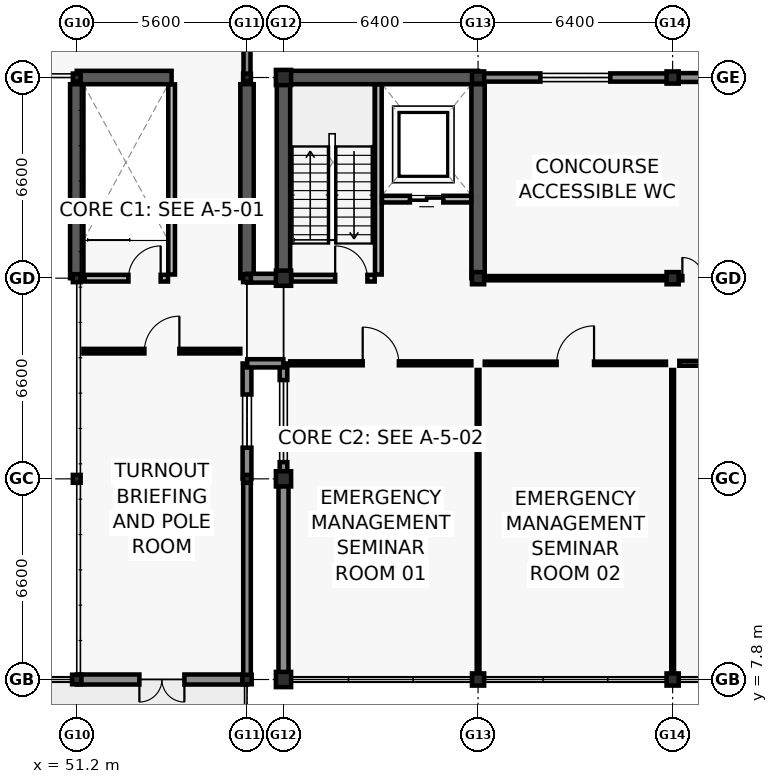
"""IFC4 building model, lengths in metres.
Left out: names, types, materials, properties, quantities, classifications, styles, units other than length and angle.
Written with IfcOpenShell. Run it as: python <this file> out.ifc"""

import sys

from ifc_helpers import new_model, si_unit, direction, frame, frame_2d, origin, origin_2d, place, context, subcontext, project, spatial, rectangle, i_section, extrude, element, fill, save


model = new_model("IFC4")
c1 = context("Model", 3, precision=1e-05, world=origin(), true_north=direction((0.0, 1.0)))
c2 = subcontext(c1, "Body", "Model", "MODEL_VIEW")
j1 = project(units=[si_unit("LENGTHUNIT", "METRE"), si_unit("PLANEANGLEUNIT", "RADIAN")], contexts=[c1])
p1 = place(None, origin())
s1 = spatial("IfcSite", under=j1, at=p1, CompositionType="ELEMENT")
p2 = place(p1, origin())
s2 = spatial("IfcBuilding", under=s1, at=p2, CompositionType="ELEMENT")
p3 = place(p2, frame((0.0, 0.0, 5.4)))
s3 = spatial("IfcBuildingStorey", under=s2, at=p3, CompositionType="ELEMENT", Elevation=5.4)
p4 = place(p3, frame((51.2, 7.8, 0.0), z_axis=(0.0, 0.0, 1.0), x_axis=(1.0, 0.0, 0.0)))
e1 = element("IfcColumn", 1, at=p4, inside=s3, PredefinedType="COLUMN", context=c2, shape_type="SweptSolid", body=[
    extrude(i_section(OverallWidth=0.307, OverallDepth=0.315, WebThickness=0.012, FlangeThickness=0.019, FilletRadius=0.017, at=origin_2d()), origin(), (0.0, 0.0, 1.0), 4.2),
])
for number, where, z_axis, x_axis in (
    (2, (51.2, 14.4, 0.0), (0.0, 0.0, 1.0), (1.0, 0.0, 0.0)),
    (3, (51.2, 21.0, 0.0), (0.0, 0.0, 1.0), (1.0, 0.0, 0.0)),
    (4, (51.2, 27.6, 0.0), (0.0, 0.0, 1.0), (1.0, 0.0, 0.0)),
):
    element("IfcColumn", number, at=place(p3, frame(where, z_axis=z_axis, x_axis=x_axis)), inside=s3, PredefinedType="COLUMN", context=c2, shape_type="SweptSolid", body=[
        extrude(i_section(OverallWidth=0.256, OverallDepth=0.26, WebThickness=0.01, FlangeThickness=0.017, FilletRadius=0.013, at=origin_2d()), origin(), (0.0, 0.0, 1.0), 4.2),
    ])
p5 = place(p3, frame((56.8, 7.8, 0.0), z_axis=(0.0, 0.0, 1.0), x_axis=(1.0, 0.0, 0.0)))
e5 = element("IfcColumn", 5, at=p5, inside=s3, PredefinedType="COLUMN", context=c2, shape_type="SweptSolid", body=[
    extrude(i_section(OverallWidth=0.307, OverallDepth=0.315, WebThickness=0.012, FlangeThickness=0.019, FilletRadius=0.017, at=origin_2d()), origin(), (0.0, 0.0, 1.0), 4.2),
])
for number, where, z_axis, x_axis in (
    (6, (56.8, 14.4, 0.0), (0.0, 0.0, 1.0), (1.0, 0.0, 0.0)),
    (7, (56.8, 21.0, 0.0), (0.0, 0.0, 1.0), (1.0, 0.0, 0.0)),
    (8, (56.8, 27.6, 0.0), (0.0, 0.0, 1.0), (1.0, 0.0, 0.0)),
):
    element("IfcColumn", number, at=place(p3, frame(where, z_axis=z_axis, x_axis=x_axis)), inside=s3, PredefinedType="COLUMN", context=c2, shape_type="SweptSolid", body=[
        extrude(i_section(OverallWidth=0.256, OverallDepth=0.26, WebThickness=0.01, FlangeThickness=0.017, FilletRadius=0.013, at=origin_2d()), origin(), (0.0, 0.0, 1.0), 4.2),
    ])
for number, where, z_axis, x_axis in (
    (9, (58.0, 7.8, 0.0), (0.0, 0.0, 1.0), (1.0, 0.0, 0.0)),
    (10, (58.0, 14.4, 0.0), (0.0, 0.0, 1.0), (1.0, 0.0, 0.0)),
    (11, (58.0, 21.0, 0.0), (0.0, 0.0, 1.0), (1.0, 0.0, 0.0)),
    (12, (58.0, 27.6, 0.0), (0.0, 0.0, 1.0), (1.0, 0.0, 0.0)),
):
    element("IfcColumn", number, at=place(p3, frame(where, z_axis=z_axis, x_axis=x_axis)), inside=s3, PredefinedType="COLUMN", context=c2, shape_type="SweptSolid", body=[
        extrude(i_section(OverallWidth=0.5, OverallDepth=0.5, WebThickness=0.02, FlangeThickness=0.036, at=origin_2d()), origin(), (0.0, 0.0, 1.0), 4.2),
    ])
for number, where, z_axis, x_axis in (
    (13, (64.4, 7.8, 0.0), (0.0, 0.0, 1.0), (1.0, 0.0, 0.0)),
    (14, (64.4, 21.0, 0.0), (0.0, 0.0, 1.0), (1.0, 0.0, 0.0)),
    (15, (64.4, 27.6, 0.0), (0.0, 0.0, 1.0), (1.0, 0.0, 0.0)),
    (16, (70.8, 7.8, 0.0), (0.0, 0.0, 1.0), (1.0, 0.0, 0.0)),
    (17, (70.8, 21.0, 0.0), (0.0, 0.0, 1.0), (1.0, 0.0, 0.0)),
    (18, (70.8, 27.6, 0.0), (0.0, 0.0, 1.0), (1.0, 0.0, 0.0)),
):
    element("IfcColumn", number, at=place(p3, frame(where, z_axis=z_axis, x_axis=x_axis)), inside=s3, PredefinedType="COLUMN", context=c2, shape_type="SweptSolid", body=[
        extrude(i_section(OverallWidth=0.4, OverallDepth=0.4, WebThickness=0.02, FlangeThickness=0.032, at=origin_2d()), origin(), (0.0, 0.0, 1.0), 4.2),
    ])
p6 = place(p3, frame((51.2, 27.6, 0.0), z_axis=(0.0, 0.0, 1.0), x_axis=(1.0, 0.0, 0.0)))
e19 = element("IfcWall", 19, at=p6, inside=s3, PredefinedType="SHEAR", context=c2, shape_type="SweptSolid", body=[
    extrude(rectangle(XDim=3.12, YDim=0.44, at=frame_2d((1.56, 0.0))), origin(), (0.0, 0.0, 1.0), 3.96),
])
for number, where, z_axis, x_axis in (
    (20, (51.2, 21.0, 0.0), (0.0, 0.0, 1.0), (0.0, 1.0, 0.0)),
    (21, (56.8, 21.0, 0.0), (0.0, 0.0, 1.0), (0.0, 1.0, 0.0)),
):
    element("IfcWall", number, at=place(p3, frame(where, z_axis=z_axis, x_axis=x_axis)), inside=s3, PredefinedType="SHEAR", context=c2, shape_type="SweptSolid", body=[
        extrude(rectangle(XDim=6.38, YDim=0.44, at=frame_2d((3.19, 0.0))), origin(), (0.0, 0.0, 1.0), 3.96),
    ])
p7 = place(p3, frame((58.0, 27.6, 0.0), z_axis=(0.0, 0.0, 1.0), x_axis=(1.0, 0.0, 0.0)))
e22 = element("IfcWall", 22, at=p7, inside=s3, PredefinedType="SHEAR", context=c2, shape_type="SweptSolid", body=[
    extrude(rectangle(XDim=6.4, YDim=0.44, at=frame_2d((3.2, 0.0))), origin(), (0.0, 0.0, 1.0), 3.96),
])
for number, where, z_axis, x_axis in (
    (23, (58.0, 21.0, 0.0), (0.0, 0.0, 1.0), (0.0, 1.0, 0.0)),
    (24, (64.4, 21.0, 0.0), (0.0, 0.0, 1.0), (0.0, 1.0, 0.0)),
):
    element("IfcWall", number, at=place(p3, frame(where, z_axis=z_axis, x_axis=x_axis)), inside=s3, PredefinedType="SHEAR", context=c2, shape_type="SweptSolid", body=[
        extrude(rectangle(XDim=6.38, YDim=0.44, at=frame_2d((3.19, 0.0))), origin(), (0.0, 0.0, 1.0), 3.96),
    ])
p8 = place(p3, frame((56.795, 7.8, 0.0), z_axis=(0.0, 0.0, 1.0), x_axis=(-1.0, 0.0, 0.0)))
e25 = element("IfcWall", 25, at=p8, inside=s3, PredefinedType="SOLIDWALL", context=c2, shape_type="SweptSolid", body=[
    extrude(rectangle(XDim=5.59, YDim=0.33, at=frame_2d((2.795, 0.0))), origin(), (0.0, 0.0, 1.0), 3.32),
])
p9 = place(p8, frame((2.055, 0.0, 0.0)))
e26 = element("IfcOpeningElement", 26, at=p9, cuts=e25, PredefinedType="OPENING", context=c2, shape_type="SweptSolid", body=[
    extrude(rectangle(XDim=1.48, YDim=2.16, at=frame_2d((0.74, 1.08))), frame((0.0, 0.175, 0.0), z_axis=(0.0, -1.0, 0.0), x_axis=(1.0, 0.0, 0.0)), (0.0, 0.0, 1.0), 0.35),
])
p10 = place(p3, frame((56.8, 14.395, 0.0), z_axis=(0.0, 0.0, 1.0), x_axis=(0.0, -1.0, 0.0)))
e27 = element("IfcWall", 27, at=p10, inside=s3, PredefinedType="SOLIDWALL", context=c2, shape_type="SweptSolid", body=[
    extrude(rectangle(XDim=6.59, YDim=0.25, at=frame_2d((3.295, 0.0))), origin(), (0.0, 0.0, 1.0), 3.32),
])
p11 = place(p3, frame((56.8, 18.195, 0.0), z_axis=(0.0, 0.0, 1.0), x_axis=(0.0, -1.0, 0.0)))
e28 = element("IfcWall", 28, at=p11, inside=s3, PredefinedType="SOLIDWALL", context=c2, shape_type="SweptSolid", body=[
    extrude(rectangle(XDim=3.79, YDim=0.29, at=frame_2d((1.895, 0.0))), origin(), (0.0, 0.0, 1.0), 3.32),
])
p12 = place(p11, frame((1.02, 0.0, 0.8)))
e29 = element("IfcOpeningElement", 29, at=p12, cuts=e28, PredefinedType="OPENING", context=c2, shape_type="SweptSolid", body=[
    extrude(rectangle(XDim=1.75, YDim=1.8, at=frame_2d((0.875, 0.9))), frame((0.0, 0.155, 0.0), z_axis=(0.0, -1.0, 0.0), x_axis=(1.0, 0.0, 0.0)), (0.0, 0.0, 1.0), 0.31),
])
p13 = place(p3, frame((56.8, 34.195, 0.0), z_axis=(0.0, 0.0, 1.0), x_axis=(0.0, -1.0, 0.0)))
e30 = element("IfcWall", 30, at=p13, inside=s3, PredefinedType="SOLIDWALL", context=c2, shape_type="SweptSolid", body=[
    extrude(rectangle(XDim=6.59, YDim=0.23, at=frame_2d((3.295, 0.0))), origin(), (0.0, 0.0, 1.0), 3.32),
])
p14 = place(p13, frame((0.913, 0.0, 0.8)))
e31 = element("IfcOpeningElement", 31, at=p14, cuts=e30, PredefinedType="OPENING", context=c2, shape_type="SweptSolid", body=[
    extrude(rectangle(XDim=2.2, YDim=1.8, at=frame_2d((1.1, 0.9))), frame((0.0, 0.125, 0.0), z_axis=(0.0, -1.0, 0.0), x_axis=(1.0, 0.0, 0.0)), (0.0, 0.0, 1.0), 0.25),
])
p15 = place(p3, frame((64.405, 27.6, 0.0), z_axis=(0.0, 0.0, 1.0), x_axis=(1.0, 0.0, 0.0)))
e32 = element("IfcWall", 32, at=p15, inside=s3, PredefinedType="SOLIDWALL", context=c2, shape_type="SweptSolid", body=[
    extrude(rectangle(XDim=6.39, YDim=0.27, at=frame_2d((3.195, 0.0))), origin(), (0.0, 0.0, 1.0), 3.32),
])
p16 = place(p15, frame((2.045, 0.0, 0.72)))
e33 = element("IfcOpeningElement", 33, at=p16, cuts=e32, PredefinedType="OPENING", context=c2, shape_type="SweptSolid", body=[
    extrude(rectangle(XDim=2.3, YDim=1.15, at=frame_2d((1.15, 0.575))), frame((0.0, 0.145, 0.0), z_axis=(0.0, -1.0, 0.0), x_axis=(1.0, 0.0, 0.0)), (0.0, 0.0, 1.0), 0.29),
])
p17 = place(p3, frame((70.805, 27.6, 0.0), z_axis=(0.0, 0.0, 1.0), x_axis=(1.0, 0.0, 0.0)))
e34 = element("IfcWall", 34, at=p17, inside=s3, PredefinedType="SOLIDWALL", context=c2, shape_type="SweptSolid", body=[
    extrude(rectangle(XDim=6.39, YDim=0.29, at=frame_2d((3.195, 0.0))), origin(), (0.0, 0.0, 1.0), 3.32),
])
p18 = place(p17, frame((1.945, 0.0, 0.72)))
e35 = element("IfcOpeningElement", 35, at=p18, cuts=e34, PredefinedType="OPENING", context=c2, shape_type="SweptSolid", body=[
    extrude(rectangle(XDim=2.5, YDim=1.15, at=frame_2d((1.25, 0.575))), frame((0.0, 0.155, 0.0), z_axis=(0.0, -1.0, 0.0), x_axis=(1.0, 0.0, 0.0)), (0.0, 0.0, 1.0), 0.31),
])
p19 = place(p3, frame((58.0, 7.805, 0.0), z_axis=(0.0, 0.0, 1.0), x_axis=(0.0, 1.0, 0.0)))
e36 = element("IfcWall", 36, at=p19, inside=s3, PredefinedType="SOLIDWALL", context=c2, shape_type="SweptSolid", body=[
    extrude(rectangle(XDim=6.59, YDim=0.33, at=frame_2d((3.295, 0.0))), origin(), (0.0, 0.0, 1.0), 3.32),
])
p20 = place(p3, frame((58.0, 14.405, 0.0), z_axis=(0.0, 0.0, 1.0), x_axis=(0.0, 1.0, 0.0)))
e37 = element("IfcWall", 37, at=p20, inside=s3, PredefinedType="SOLIDWALL", context=c2, shape_type="SweptSolid", body=[
    extrude(rectangle(XDim=3.79, YDim=0.25, at=frame_2d((1.895, 0.0))), origin(), (0.0, 0.0, 1.0), 3.32),
])
p21 = place(p20, frame((0.545, 0.0, 0.72)))
e38 = element("IfcOpeningElement", 38, at=p21, cuts=e37, PredefinedType="OPENING", context=c2, shape_type="SweptSolid", body=[
    extrude(rectangle(XDim=2.7, YDim=1.15, at=frame_2d((1.35, 0.575))), frame((0.0, 0.135, 0.0), z_axis=(0.0, -1.0, 0.0), x_axis=(1.0, 0.0, 0.0)), (0.0, 0.0, 1.0), 0.27),
])
p22 = place(p3, frame((57.995, 18.2, 0.0), z_axis=(0.0, 0.0, 1.0), x_axis=(-1.0, 0.0, 0.0)))
e39 = element("IfcWall", 39, at=p22, inside=s3, PredefinedType="SOLIDWALL", context=c2, shape_type="SweptSolid", body=[
    extrude(rectangle(XDim=1.19, YDim=0.27, at=frame_2d((0.595, 0.0))), origin(), (0.0, 0.0, 1.0), 3.32),
])
p23 = place(p3, frame((56.805, 21.0, 0.0), z_axis=(0.0, 0.0, 1.0), x_axis=(1.0, 0.0, 0.0)))
e40 = element("IfcWall", 40, at=p23, inside=s3, PredefinedType="SOLIDWALL", context=c2, shape_type="SweptSolid", body=[
    extrude(rectangle(XDim=1.19, YDim=0.29, at=frame_2d((0.595, 0.0))), origin(), (0.0, 0.0, 1.0), 3.32),
])
p24 = place(p3, frame((54.32, 21.12, 0.0), z_axis=(0.0, 0.0, 1.0), x_axis=(0.0, 1.0, 0.0)))
e41 = element("IfcWall", 41, at=p24, inside=s3, PredefinedType="SOLIDWALL", context=c2, shape_type="SweptSolid", body=[
    extrude(rectangle(XDim=6.255, YDim=0.22, at=frame_2d((3.127, 0.0))), origin(), (0.0, 0.0, 1.0), 3.96),
])
p25 = place(p3, frame((51.46, 21.0, 0.0), z_axis=(0.0, 0.0, 1.0), x_axis=(1.0, 0.0, 0.0)))
e42 = element("IfcWall", 42, at=p25, inside=s3, PredefinedType="SOLIDWALL", context=c2, shape_type="SweptSolid", body=[
    extrude(rectangle(XDim=2.74, YDim=0.22, at=frame_2d((1.37, 0.0))), origin(), (0.0, 0.0, 1.0), 3.32),
])
p26 = place(p25, frame((1.44, 0.0, 0.0)))
e43 = element("IfcOpeningElement", 43, at=p26, cuts=e42, PredefinedType="OPENING", context=c2, shape_type="SweptSolid", body=[
    extrude(rectangle(XDim=1.06, YDim=2.1, at=frame_2d((0.53, 1.05))), frame((0.0, 0.12, 0.0), z_axis=(0.0, -1.0, 0.0), x_axis=(1.0, 0.0, 0.0)), (0.0, 0.0, 1.0), 0.24),
])
p27 = place(p3, frame((61.12, 21.12, 0.0), z_axis=(0.0, 0.0, 1.0), x_axis=(0.0, 1.0, 0.0)))
e44 = element("IfcWall", 44, at=p27, inside=s3, PredefinedType="SOLIDWALL", context=c2, shape_type="SweptSolid", body=[
    extrude(rectangle(XDim=6.255, YDim=0.22, at=frame_2d((3.127, 0.0))), origin(), (0.0, 0.0, 1.0), 3.96),
])
p28 = place(p3, frame((58.26, 21.0, 0.0), z_axis=(0.0, 0.0, 1.0), x_axis=(1.0, 0.0, 0.0)))
e45 = element("IfcWall", 45, at=p28, inside=s3, PredefinedType="SOLIDWALL", context=c2, shape_type="SweptSolid", body=[
    extrude(rectangle(XDim=2.74, YDim=0.22, at=frame_2d((1.37, 0.0))), origin(), (0.0, 0.0, 1.0), 3.32),
])
p29 = place(p28, frame((1.44, 0.0, 0.0)))
e46 = element("IfcOpeningElement", 46, at=p29, cuts=e45, PredefinedType="OPENING", context=c2, shape_type="SweptSolid", body=[
    extrude(rectangle(XDim=1.06, YDim=2.1, at=frame_2d((0.53, 1.05))), frame((0.0, 0.12, 0.0), z_axis=(0.0, -1.0, 0.0), x_axis=(1.0, 0.0, 0.0)), (0.0, 0.0, 1.0), 0.24),
])
p30 = place(p3, frame((61.24, 23.6, 0.0), z_axis=(0.0, 0.0, 1.0), x_axis=(1.0, 0.0, 0.0)))
e47 = element("IfcWall", 47, at=p30, inside=s3, PredefinedType="SOLIDWALL", context=c2, shape_type="SweptSolid", body=[
    extrude(rectangle(XDim=2.935, YDim=0.22, at=frame_2d((1.468, 0.0))), origin(), (0.0, 0.0, 1.0), 3.96),
])
p31 = place(p30, frame((0.917, 0.0, 0.0)))
e48 = element("IfcOpeningElement", 48, at=p31, cuts=e47, PredefinedType="OPENING", context=c2, shape_type="SweptSolid", body=[
    extrude(rectangle(XDim=1.1, YDim=2.1, at=frame_2d((0.55, 1.05))), frame((0.0, 0.12, 0.0), z_axis=(0.0, -1.0, 0.0), x_axis=(1.0, 0.0, 0.0)), (0.0, 0.0, 1.0), 0.24),
])
p32 = place(p3, frame((51.42, 18.6, 0.0), z_axis=(0.0, 0.0, 1.0), x_axis=(1.0, 0.0, 0.0)))
e49 = element("IfcWall", 49, at=p32, inside=s3, PredefinedType="PARTITIONING", context=c2, shape_type="SweptSolid", body=[
    extrude(rectangle(XDim=5.16, YDim=0.15, at=frame_2d((2.58, 0.0))), origin(), (0.0, 0.0, 1.0), 3.3),
])
p33 = place(p32, frame((2.005, 0.0, 0.0)))
e50 = element("IfcOpeningElement", 50, at=p33, cuts=e49, PredefinedType="OPENING", context=c2, shape_type="SweptSolid", body=[
    extrude(rectangle(XDim=1.15, YDim=2.12, at=frame_2d((0.575, 1.06))), frame((0.0, 0.085, 0.0), z_axis=(0.0, -1.0, 0.0), x_axis=(1.0, 0.0, 0.0)), (0.0, 0.0, 1.0), 0.17),
])
p34 = place(p3, frame((64.4, 8.02, 0.0), z_axis=(0.0, 0.0, 1.0), x_axis=(0.0, 1.0, 0.0)))
e51 = element("IfcWall", 51, at=p34, inside=s3, PredefinedType="MOVABLE", context=c2, shape_type="SweptSolid", body=[
    extrude(rectangle(XDim=9.96, YDim=0.09, at=frame_2d((4.98, 0.0))), origin(), (0.0, 0.0, 1.0), 3.3),
])
p35 = place(p3, frame((58.22, 18.2, 0.0), z_axis=(0.0, 0.0, 1.0), x_axis=(1.0, 0.0, 0.0)))
e52 = element("IfcWall", 52, at=p35, inside=s3, PredefinedType="PARTITIONING", context=c2, shape_type="SweptSolid", body=[
    extrude(rectangle(XDim=5.96, YDim=0.13, at=frame_2d((2.98, 0.0))), origin(), (0.0, 0.0, 1.0), 3.3),
])
p36 = place(p35, frame((2.385, 0.0, 0.0)))
e53 = element("IfcOpeningElement", 53, at=p36, cuts=e52, PredefinedType="OPENING", context=c2, shape_type="SweptSolid", body=[
    extrude(rectangle(XDim=1.19, YDim=2.14, at=frame_2d((0.595, 1.07))), frame((0.0, 0.075, 0.0), z_axis=(0.0, -1.0, 0.0), x_axis=(1.0, 0.0, 0.0)), (0.0, 0.0, 1.0), 0.15),
])
p37 = place(p3, frame((70.8, 8.02, 0.0), z_axis=(0.0, 0.0, 1.0), x_axis=(0.0, 1.0, 0.0)))
e54 = element("IfcWall", 54, at=p37, inside=s3, PredefinedType="MOVABLE", context=c2, shape_type="SweptSolid", body=[
    extrude(rectangle(XDim=9.96, YDim=0.09, at=frame_2d((4.98, 0.0))), origin(), (0.0, 0.0, 1.0), 3.3),
])
p38 = place(p3, frame((64.62, 18.2, 0.0), z_axis=(0.0, 0.0, 1.0), x_axis=(1.0, 0.0, 0.0)))
e55 = element("IfcWall", 55, at=p38, inside=s3, PredefinedType="PARTITIONING", context=c2, shape_type="SweptSolid", body=[
    extrude(rectangle(XDim=5.96, YDim=0.11, at=frame_2d((2.98, 0.0))), origin(), (0.0, 0.0, 1.0), 3.3),
])
p39 = place(p38, frame((2.365, 0.0, 0.0)))
e56 = element("IfcOpeningElement", 56, at=p39, cuts=e55, PredefinedType="OPENING", context=c2, shape_type="SweptSolid", body=[
    extrude(rectangle(XDim=1.23, YDim=2.08, at=frame_2d((0.615, 1.04))), frame((0.0, 0.065, 0.0), z_axis=(0.0, -1.0, 0.0), x_axis=(1.0, 0.0, 0.0)), (0.0, 0.0, 1.0), 0.13),
])
p40 = place(p3, frame((71.02, 18.2, 0.0), z_axis=(0.0, 0.0, 1.0), x_axis=(1.0, 0.0, 0.0)))
e57 = element("IfcWall", 57, at=p40, inside=s3, PredefinedType="PARTITIONING", context=c2, shape_type="SweptSolid", body=[
    extrude(rectangle(XDim=5.96, YDim=0.16, at=frame_2d((2.98, 0.0))), origin(), (0.0, 0.0, 1.0), 3.3),
])
p41 = place(p40, frame((2.345, 0.0, 0.0)))
e58 = element("IfcOpeningElement", 58, at=p41, cuts=e57, PredefinedType="OPENING", context=c2, shape_type="SweptSolid", body=[
    extrude(rectangle(XDim=1.27, YDim=2.1, at=frame_2d((0.635, 1.05))), frame((0.0, 0.09, 0.0), z_axis=(0.0, -1.0, 0.0), x_axis=(1.0, 0.0, 0.0)), (0.0, 0.0, 1.0), 0.18),
])
p42 = place(p3, frame((64.62, 21.0, 0.0), z_axis=(0.0, 0.0, 1.0), x_axis=(1.0, 0.0, 0.0)))
e59 = element("IfcWall", 59, at=p42, inside=s3, PredefinedType="PARTITIONING", context=c2, shape_type="SweptSolid", body=[
    extrude(rectangle(XDim=12.36, YDim=0.14, at=frame_2d((6.18, 0.0))), origin(), (0.0, 0.0, 1.0), 3.3),
])
p43 = place(p42, frame((6.5, 0.0, 0.0)))
e60 = element("IfcOpeningElement", 60, at=p43, cuts=e59, PredefinedType="OPENING", context=c2, shape_type="SweptSolid", body=[
    extrude(rectangle(XDim=1.36, YDim=2.15, at=frame_2d((0.68, 1.075))), frame((0.0, 0.08, 0.0), z_axis=(0.0, -1.0, 0.0), x_axis=(1.0, 0.0, 0.0)), (0.0, 0.0, 1.0), 0.16),
])
p44 = place(p9, origin())
e61 = element("IfcDoor", 61, at=p44, inside=s3, OperationType="DOUBLE_DOOR_SINGLE_SWING", PredefinedType="DOOR", context=c2, shape_type="SweptSolid", body=[
    extrude(rectangle(XDim=1.48, YDim=2.16, at=frame_2d((0.74, 1.08))), frame((0.0, 0.025, 0.0), z_axis=(0.0, -1.0, 0.0), x_axis=(1.0, 0.0, 0.0)), (0.0, 0.0, 1.0), 0.05),
])
fill(e26, e61)
p45 = place(p12, origin())
e62 = element("IfcWindow", 62, at=p45, inside=s3, PartitioningType="DOUBLE_PANEL_VERTICAL", PredefinedType="WINDOW", context=c2, shape_type="SweptSolid", body=[
    extrude(rectangle(XDim=1.75, YDim=1.8, at=frame_2d((0.875, 0.9))), frame((0.0, 0.03, 0.0), z_axis=(0.0, -1.0, 0.0), x_axis=(1.0, 0.0, 0.0)), (0.0, 0.0, 1.0), 0.06),
])
fill(e29, e62)
p46 = place(p16, origin())
e63 = element("IfcWindow", 63, at=p46, inside=s3, PartitioningType="DOUBLE_PANEL_VERTICAL", PredefinedType="WINDOW", context=c2, shape_type="SweptSolid", body=[
    extrude(rectangle(XDim=2.3, YDim=1.15, at=frame_2d((1.15, 0.575))), frame((0.0, 0.03, 0.0), z_axis=(0.0, -1.0, 0.0), x_axis=(1.0, 0.0, 0.0)), (0.0, 0.0, 1.0), 0.06),
])
fill(e33, e63)
p47 = place(p21, origin())
e64 = element("IfcWindow", 64, at=p47, inside=s3, PartitioningType="TRIPLE_PANEL_VERTICAL", PredefinedType="WINDOW", context=c2, shape_type="SweptSolid", body=[
    extrude(rectangle(XDim=2.7, YDim=1.15, at=frame_2d((1.35, 0.575))), frame((0.0, 0.03, 0.0), z_axis=(0.0, -1.0, 0.0), x_axis=(1.0, 0.0, 0.0)), (0.0, 0.0, 1.0), 0.06),
])
fill(e38, e64)
p48 = place(p26, origin())
e65 = element("IfcDoor", 65, at=p48, inside=s3, OperationType="SINGLE_SWING_RIGHT", PredefinedType="DOOR", context=c2, shape_type="SweptSolid", body=[
    extrude(rectangle(XDim=1.06, YDim=2.1, at=frame_2d((0.53, 1.05))), frame((0.0, 0.025, 0.0), z_axis=(0.0, -1.0, 0.0), x_axis=(1.0, 0.0, 0.0)), (0.0, 0.0, 1.0), 0.05),
])
fill(e43, e65)
p49 = place(p29, origin())
e66 = element("IfcDoor", 66, at=p49, inside=s3, OperationType="SINGLE_SWING_LEFT", PredefinedType="DOOR", context=c2, shape_type="SweptSolid", body=[
    extrude(rectangle(XDim=1.06, YDim=2.1, at=frame_2d((0.53, 1.05))), frame((0.0, 0.025, 0.0), z_axis=(0.0, -1.0, 0.0), x_axis=(1.0, 0.0, 0.0)), (0.0, 0.0, 1.0), 0.05),
])
fill(e46, e66)
p50 = place(p31, origin())
e67 = element("IfcDoor", 67, at=p50, inside=s3, OperationType="DOUBLE_DOOR_SLIDING", PredefinedType="DOOR", context=c2, shape_type="SweptSolid", body=[
    extrude(rectangle(XDim=1.1, YDim=2.1, at=frame_2d((0.55, 1.05))), frame((0.0, 0.025, 0.0), z_axis=(0.0, -1.0, 0.0), x_axis=(1.0, 0.0, 0.0)), (0.0, 0.0, 1.0), 0.05),
])
fill(e48, e67)
p51 = place(p33, origin())
e68 = element("IfcDoor", 68, at=p51, inside=s3, OperationType="SINGLE_SWING_RIGHT", PredefinedType="DOOR", context=c2, shape_type="SweptSolid", body=[
    extrude(rectangle(XDim=1.15, YDim=2.12, at=frame_2d((0.575, 1.06))), frame((0.0, 0.025, 0.0), z_axis=(0.0, -1.0, 0.0), x_axis=(1.0, 0.0, 0.0)), (0.0, 0.0, 1.0), 0.05),
])
fill(e50, e68)
p52 = place(p36, origin())
e69 = element("IfcDoor", 69, at=p52, inside=s3, OperationType="SINGLE_SWING_LEFT", PredefinedType="DOOR", context=c2, shape_type="SweptSolid", body=[
    extrude(rectangle(XDim=1.19, YDim=2.14, at=frame_2d((0.595, 1.07))), frame((0.0, 0.025, 0.0), z_axis=(0.0, -1.0, 0.0), x_axis=(1.0, 0.0, 0.0)), (0.0, 0.0, 1.0), 0.05),
])
fill(e53, e69)
p53 = place(p39, origin())
e70 = element("IfcDoor", 70, at=p53, inside=s3, OperationType="SINGLE_SWING_RIGHT", PredefinedType="DOOR", context=c2, shape_type="SweptSolid", body=[
    extrude(rectangle(XDim=1.23, YDim=2.08, at=frame_2d((0.615, 1.04))), frame((0.0, 0.025, 0.0), z_axis=(0.0, -1.0, 0.0), x_axis=(1.0, 0.0, 0.0)), (0.0, 0.0, 1.0), 0.05),
])
fill(e56, e70)
p54 = place(p43, origin())
e71 = element("IfcDoor", 71, at=p54, inside=s3, OperationType="DOUBLE_DOOR_SINGLE_SWING", PredefinedType="DOOR", context=c2, shape_type="SweptSolid", body=[
    extrude(rectangle(XDim=1.36, YDim=2.15, at=frame_2d((0.68, 1.075))), frame((0.0, 0.025, 0.0), z_axis=(0.0, -1.0, 0.0), x_axis=(1.0, 0.0, 0.0)), (0.0, 0.0, 1.0), 0.05),
])
fill(e60, e71)
save(model, sys.argv[1])
